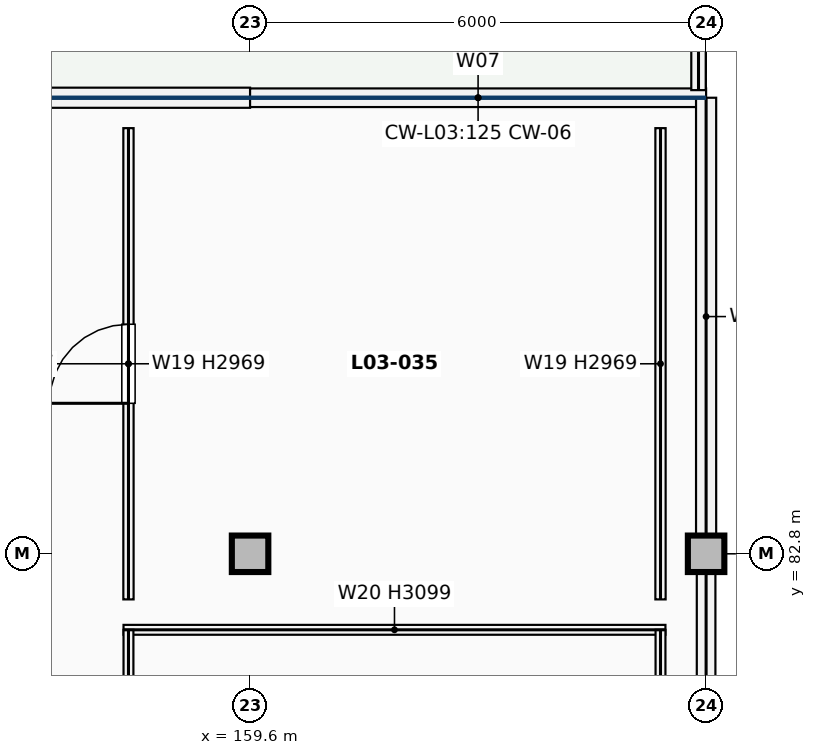
"""IFC4 building model, lengths in metres.
Left out: names, types, materials, properties, quantities, classifications, styles, units other than length and angle.
Written with IfcOpenShell. Run it as: python <this file> out.ifc"""

import sys

from ifc_helpers import new_model, si_unit, direction, frame, frame_2d, origin, origin_2d, place, context, subcontext, project, spatial, rectangle, extrude, element, fill, save


model = new_model("IFC4")
c1 = context("Model", 3, precision=1e-05, world=origin(), true_north=direction((0.0, 1.0)))
c2 = subcontext(c1, "Body", "Model", "MODEL_VIEW")
j1 = project(units=[si_unit("LENGTHUNIT", "METRE"), si_unit("PLANEANGLEUNIT", "RADIAN")], contexts=[c1])
p1 = place(None, origin())
s1 = spatial("IfcSite", under=j1, at=p1, CompositionType="ELEMENT")
p2 = place(p1, origin())
s2 = spatial("IfcBuilding", under=s1, at=p2, CompositionType="ELEMENT")
p3 = place(p2, frame((0.0, 0.0, 13.6)))
s3 = spatial("IfcBuildingStorey", under=s2, at=p3, CompositionType="ELEMENT", Elevation=13.6)
for number, where, z_axis, x_axis in (
    (1, (159.6, 82.8, 0.0), (0.0, 0.0, 1.0), (1.0, 0.0, 0.0)),
    (2, (165.6, 82.8, 0.0), (0.0, 0.0, 1.0), (1.0, 0.0, 0.0)),
):
    element("IfcColumn", number, at=place(p3, frame(where, z_axis=z_axis, x_axis=x_axis)), inside=s3, PredefinedType="COLUMN", context=c2, shape_type="SweptSolid", body=[
        extrude(rectangle(XDim=0.48, YDim=0.48, at=origin_2d()), origin(), (0.0, 0.0, 1.0), 3.74),
    ])
p4 = place(p3, frame((150.0, 88.8, 0.0), z_axis=(0.0, 0.0, 1.0), x_axis=(1.0, 0.0, 0.0)))
e3 = element("IfcWall", 3, at=p4, inside=s3, PredefinedType="SOLIDWALL", context=c2, shape_type="SweptSolid", body=[
    extrude(rectangle(XDim=9.6, YDim=0.265, at=frame_2d((4.8, 0.0))), origin(), (0.0, 0.0, 1.0), 0.85),
])
p5 = place(p3, frame((159.6, 88.8, 0.0), z_axis=(0.0, 0.0, 1.0), x_axis=(1.0, 0.0, 0.0)))
e4 = element("IfcWall", 4, at=p5, inside=s3, PredefinedType="SOLIDWALL", context=c2, shape_type="SweptSolid", body=[
    extrude(rectangle(XDim=6.0, YDim=0.245, at=frame_2d((3.0, 0.0))), origin(), (0.0, 0.0, 1.0), 0.85),
])
p6 = place(p3, frame((165.6, 79.442, 0.0), z_axis=(0.0, 0.0, 1.0), x_axis=(0.0, 1.0, 0.0)))
e5 = element("IfcWall", 5, at=p6, inside=s3, PredefinedType="SOLIDWALL", context=c2, shape_type="SweptSolid", body=[
    extrude(rectangle(XDim=3.116, YDim=0.245, at=frame_2d((1.558, 0.0))), origin(), (0.0, 0.0, 1.0), 2.969),
])
p7 = place(p3, frame((165.6, 83.042, 0.0), z_axis=(0.0, 0.0, 1.0), x_axis=(0.0, 1.0, 0.0)))
e6 = element("IfcWall", 6, at=p7, inside=s3, PredefinedType="SOLIDWALL", context=c2, shape_type="SweptSolid", body=[
    extrude(rectangle(XDim=5.758, YDim=0.265, at=frame_2d((2.879, 0.0))), origin(), (0.0, 0.0, 1.0), 2.969),
])
p8 = place(p3, frame((165.5, 88.9, 0.0), z_axis=(0.0, 0.0, 1.0), x_axis=(0.0, 1.0, 0.0)))
e7 = element("IfcWall", 7, at=p8, inside=s3, PredefinedType="PARAPET", context=c2, shape_type="SweptSolid", body=[
    extrude(rectangle(XDim=25.0, YDim=0.19, at=frame_2d((12.5, 0.0))), origin(), (0.0, 0.0, 1.0), 1.15),
])
p9 = place(p3, frame((157.935, 81.8, 0.0), z_axis=(0.0, 0.0, 1.0), x_axis=(1.0, 0.0, 0.0)))
e8 = element("IfcWall", 8, at=p9, inside=s3, PredefinedType="PARTITIONING", context=c2, shape_type="SweptSolid", body=[
    extrude(rectangle(XDim=7.13, YDim=0.13, at=frame_2d((3.565, 0.0))), origin(), (0.0, 0.0, 1.0), 3.099),
])
p10 = place(p3, frame((158.0, 72.2, 0.0), z_axis=(0.0, 0.0, 1.0), x_axis=(0.0, 1.0, 0.0)))
e9 = element("IfcWall", 9, at=p10, inside=s3, PredefinedType="PARTITIONING", context=c2, shape_type="SweptSolid", body=[
    extrude(rectangle(XDim=9.6, YDim=0.13, at=frame_2d((4.8, 0.0))), origin(), (0.0, 0.0, 1.0), 2.809),
])
p11 = place(p10, frame((2.245, 0.0, 0.0)))
e10 = element("IfcOpeningElement", 10, at=p11, cuts=e9, PredefinedType="OPENING", context=c2, shape_type="SweptSolid", body=[
    extrude(rectangle(XDim=1.02, YDim=2.18, at=frame_2d((0.51, 1.09))), frame((0.0, 0.075, 0.0), z_axis=(0.0, -1.0, 0.0), x_axis=(1.0, 0.0, 0.0)), (0.0, 0.0, 1.0), 0.15),
])
p12 = place(p3, frame((165.0, 72.2, 0.0), z_axis=(0.0, 0.0, 1.0), x_axis=(0.0, 1.0, 0.0)))
e11 = element("IfcWall", 11, at=p12, inside=s3, PredefinedType="PARTITIONING", context=c2, shape_type="SweptSolid", body=[
    extrude(rectangle(XDim=9.6, YDim=0.13, at=frame_2d((4.8, 0.0))), origin(), (0.0, 0.0, 1.0), 3.009),
])
p13 = place(p3, frame((158.0, 82.2, 0.0), z_axis=(0.0, 0.0, 1.0), x_axis=(0.0, 1.0, 0.0)))
e12 = element("IfcWall", 12, at=p13, inside=s3, PredefinedType="PARTITIONING", context=c2, shape_type="SweptSolid", body=[
    extrude(rectangle(XDim=6.2, YDim=0.135, at=frame_2d((3.1, 0.0))), origin(), (0.0, 0.0, 1.0), 2.969),
])
p14 = place(p13, frame((2.58, 0.0, 0.0)))
e13 = element("IfcOpeningElement", 13, at=p14, cuts=e12, PredefinedType="OPENING", context=c2, shape_type="SweptSolid", body=[
    extrude(rectangle(XDim=1.04, YDim=2.12, at=frame_2d((0.52, 1.06))), frame((0.0, 0.078, 0.0), z_axis=(0.0, -1.0, 0.0), x_axis=(1.0, 0.0, 0.0)), (0.0, 0.0, 1.0), 0.155),
])
p15 = place(p3, frame((165.0, 82.2, 0.0), z_axis=(0.0, 0.0, 1.0), x_axis=(0.0, 1.0, 0.0)))
e14 = element("IfcWall", 14, at=p15, inside=s3, PredefinedType="PARTITIONING", context=c2, shape_type="SweptSolid", body=[
    extrude(rectangle(XDim=6.2, YDim=0.135, at=frame_2d((3.1, 0.0))), origin(), (0.0, 0.0, 1.0), 2.969),
])
p16 = place(p14, origin())
e15 = element("IfcDoor", 15, at=p16, inside=s3, OperationType="SINGLE_SWING_LEFT", PredefinedType="DOOR", context=c2, shape_type="SweptSolid", body=[
    extrude(rectangle(XDim=1.04, YDim=2.12, at=frame_2d((0.52, 1.06))), frame((0.0, 0.025, 0.0), z_axis=(0.0, -1.0, 0.0), x_axis=(1.0, 0.0, 0.0)), (0.0, 0.0, 1.0), 0.05),
])
fill(e13, e15)
save(model, sys.argv[1])
